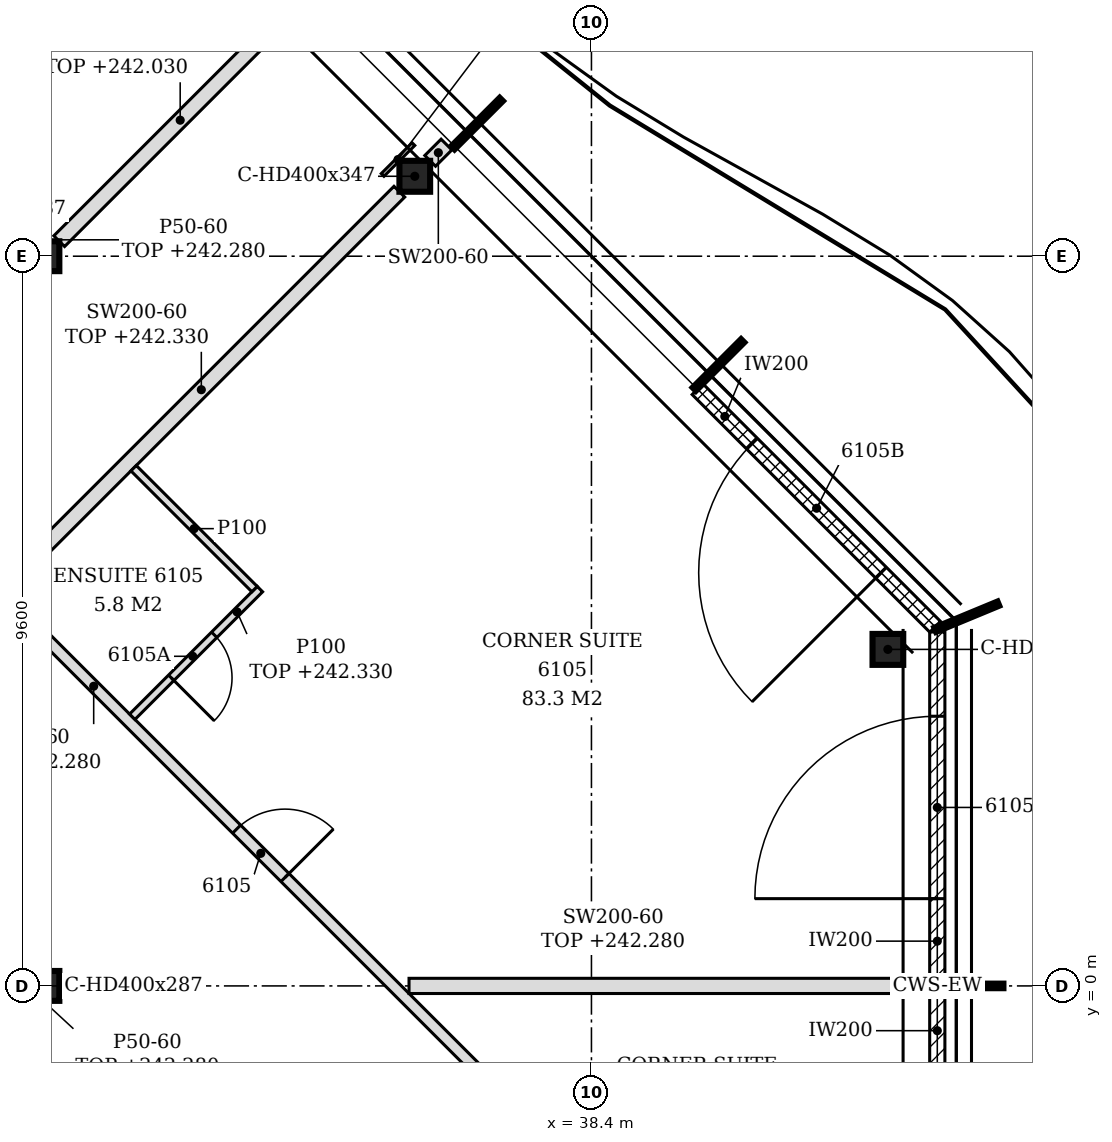
"""IFC4 building model, lengths in metres.
Left out: names, types, materials, properties, quantities, classifications, styles, units other than length and angle.
Written with IfcOpenShell. Run it as: python <this file> out.ifc"""

import sys

from ifc_helpers import new_model, si_unit, direction, frame, frame_2d, origin, origin_2d, place, context, subcontext, project, spatial, rectangle, i_section, extrude, element, fill, save


model = new_model("IFC4")
c1 = context("Model", 3, precision=1e-05, world=origin(), true_north=direction((0.0, 1.0)))
c2 = subcontext(c1, "Body", "Model", "MODEL_VIEW")
j1 = project(units=[si_unit("LENGTHUNIT", "METRE"), si_unit("PLANEANGLEUNIT", "RADIAN")], contexts=[c1])
p1 = place(None, origin())
s1 = spatial("IfcSite", under=j1, at=p1, CompositionType="ELEMENT")
p2 = place(p1, origin())
s2 = spatial("IfcBuilding", under=s1, at=p2, CompositionType="ELEMENT")
p3 = place(p2, frame((0.0, 0.0, 239.4)))
s3 = spatial("IfcBuildingStorey", under=s2, at=p3, CompositionType="ELEMENT", Elevation=239.4)
for number, where, z_axis, x_axis in (
    (1, (42.3, 4.427, -0.15), (0.0, 0.0, 1.0), (1.0, 0.0, 0.0)),
    (2, (36.076, 10.652, -0.15), (0.0, 0.0, 1.0), (1.0, 0.0, 0.0)),
):
    element("IfcColumn", number, at=place(p3, frame(where, z_axis=z_axis, x_axis=x_axis)), inside=s3, PredefinedType="COLUMN", context=c2, shape_type="SweptSolid", body=[
        extrude(i_section(OverallWidth=0.404, OverallDepth=0.407, WebThickness=0.027, FlangeThickness=0.044, FilletRadius=0.015, at=origin_2d()), origin(), (0.0, 0.0, 1.0), 3.6),
    ])
for number, where, z_axis, x_axis in (
    (3, (31.2, 0.0, -0.15), (0.0, 0.0, 1.0), (1.0, 0.0, 0.0)),
    (4, (31.2, 9.6, -0.15), (0.0, 0.0, 1.0), (1.0, 0.0, 0.0)),
):
    element("IfcColumn", number, at=place(p3, frame(where, z_axis=z_axis, x_axis=x_axis)), inside=s3, PredefinedType="COLUMN", context=c2, shape_type="SweptSolid", body=[
        extrude(i_section(OverallWidth=0.399, OverallDepth=0.393, WebThickness=0.023, FlangeThickness=0.037, FilletRadius=0.015, at=origin_2d()), origin(), (0.0, 0.0, 1.0), 3.6),
    ])
p4 = place(p3, frame((42.95, -4.656, 0.0), z_axis=(0.0, 0.0, 1.0), x_axis=(0.0, 1.0, 0.0)))
e5 = element("IfcWall", 5, at=p4, inside=s3, PredefinedType="NOTDEFINED", context=c2, shape_type="SweptSolid", body=[
    extrude(rectangle(XDim=4.626, YDim=0.2, at=frame_2d((2.313, 0.0))), origin(), (0.0, 0.0, 1.0), 3.45),
])
p5 = place(p4, frame((1.108, 0.0, 0.0)))
e6 = element("IfcOpeningElement", 6, at=p5, cuts=e5, PredefinedType="OPENING", context=c2, shape_type="SweptSolid", body=[
    extrude(rectangle(XDim=2.4, YDim=2.4, at=frame_2d((1.2, 1.2))), frame((0.0, 0.11, 0.0), z_axis=(0.0, -1.0, 0.0), x_axis=(1.0, 0.0, 0.0)), (0.0, 0.0, 1.0), 0.22),
])
p6 = place(p3, frame((42.95, 0.03, 0.0), z_axis=(0.0, 0.0, 1.0), x_axis=(0.0, 1.0, 0.0)))
e7 = element("IfcWall", 7, at=p6, inside=s3, PredefinedType="NOTDEFINED", context=c2, shape_type="SweptSolid", body=[
    extrude(rectangle(XDim=4.626, YDim=0.2, at=frame_2d((2.313, 0.0))), origin(), (0.0, 0.0, 1.0), 3.45),
])
p7 = place(p6, frame((1.118, 0.0, 0.0)))
e8 = element("IfcOpeningElement", 8, at=p7, cuts=e7, PredefinedType="OPENING", context=c2, shape_type="SweptSolid", body=[
    extrude(rectangle(XDim=2.4, YDim=2.4, at=frame_2d((1.2, 1.2))), frame((0.0, 0.11, 0.0), z_axis=(0.0, -1.0, 0.0), x_axis=(1.0, 0.0, 0.0)), (0.0, 0.0, 1.0), 0.22),
])
p8 = place(p3, frame((42.922, 4.725, 0.0), z_axis=(0.0, 0.0, 1.0), x_axis=(-0.707079168996, 0.707134392299, 0.0)))
e9 = element("IfcWall", 9, at=p8, inside=s3, PredefinedType="NOTDEFINED", context=c2, shape_type="SweptSolid", body=[
    extrude(rectangle(XDim=4.421, YDim=0.2, at=frame_2d((2.21, 0.0))), origin(), (0.0, 0.0, 1.0), 3.45),
])
p9 = place(p8, frame((1.005, 0.0, 0.0)))
e10 = element("IfcOpeningElement", 10, at=p9, cuts=e9, PredefinedType="OPENING", context=c2, shape_type="SweptSolid", body=[
    extrude(rectangle(XDim=2.4, YDim=2.4, at=frame_2d((1.2, 1.2))), frame((0.0, 0.11, 0.0), z_axis=(0.0, -1.0, 0.0), x_axis=(1.0, 0.0, 0.0)), (0.0, 0.0, 1.0), 0.22),
])
p10 = place(p3, frame((37.072, -1.278, 0.0), z_axis=(0.0, 0.0, 1.0), x_axis=(-0.707106781187, 0.707106781187, 0.0)))
e11 = element("IfcWall", 11, at=p10, inside=s3, PredefinedType="PARTITIONING", context=c2, shape_type="SweptSolid", body=[
    extrude(rectangle(XDim=20.294, YDim=0.15, at=frame_2d((10.147, 0.0))), origin(), (0.0, 0.0, 1.0), 2.88),
])
p11 = place(p10, frame((3.824, 0.0, 0.0)))
e12 = element("IfcOpeningElement", 12, at=p11, cuts=e11, PredefinedType="OPENING", context=c2, shape_type="SweptSolid", body=[
    extrude(rectangle(XDim=0.9, YDim=2.1, at=frame_2d((0.45, 1.05))), frame((0.0, 0.085, 0.0), z_axis=(0.0, -1.0, 0.0), x_axis=(1.0, 0.0, 0.0)), (0.0, 0.0, 1.0), 0.17),
])
p12 = place(p10, frame((10.042, 0.0, 0.0)))
e13 = element("IfcOpeningElement", 13, at=p12, cuts=e11, PredefinedType="OPENING", context=c2, shape_type="SweptSolid", body=[
    extrude(rectangle(XDim=0.9, YDim=2.1, at=frame_2d((0.45, 1.05))), frame((0.0, 0.085, 0.0), z_axis=(0.0, -1.0, 0.0), x_axis=(1.0, 0.0, 0.0)), (0.0, 0.0, 1.0), 0.17),
])
p13 = place(p10, frame((14.443, 0.0, 0.0)))
e14 = element("IfcOpeningElement", 14, at=p13, cuts=e11, PredefinedType="OPENING", context=c2, shape_type="SweptSolid", body=[
    extrude(rectangle(XDim=0.9, YDim=2.1, at=frame_2d((0.45, 1.05))), frame((0.0, 0.085, 0.0), z_axis=(0.0, -1.0, 0.0), x_axis=(1.0, 0.0, 0.0)), (0.0, 0.0, 1.0), 0.17),
])
p14 = place(p3, frame((36.0, 0.0, 0.0), z_axis=(0.0, 0.0, 1.0), x_axis=(1.0, 0.0, 0.0)))
e15 = element("IfcWall", 15, at=p14, inside=s3, PredefinedType="PARTITIONING", context=c2, shape_type="SweptSolid", body=[
    extrude(rectangle(XDim=6.85, YDim=0.2, at=frame_2d((3.425, 0.0))), origin(), (0.0, 0.0, 1.0), 2.88),
])
p15 = place(p3, frame((32.359, 3.541, 0.0), z_axis=(0.0, 0.0, 1.0), x_axis=(0.707158179099, 0.707055379538, 0.0)))
e16 = element("IfcWall", 16, at=p15, inside=s3, PredefinedType="PARTITIONING", context=c2, shape_type="SweptSolid", body=[
    extrude(rectangle(XDim=2.375, YDim=0.1, at=frame_2d((1.188, 0.0))), origin(), (0.0, 0.0, 1.0), 2.93),
])
p16 = place(p15, frame((0.725, 0.0, 0.0)))
e17 = element("IfcOpeningElement", 17, at=p16, cuts=e16, PredefinedType="OPENING", context=c2, shape_type="SweptSolid", body=[
    extrude(rectangle(XDim=0.8, YDim=2.1, at=frame_2d((0.4, 1.05))), frame((0.0, 0.06, 0.0), z_axis=(0.0, -1.0, 0.0), x_axis=(1.0, 0.0, 0.0)), (0.0, 0.0, 1.0), 0.12),
])
p17 = place(p3, frame((30.662, 5.238, 0.0), z_axis=(0.0, 0.0, 1.0), x_axis=(0.707106781187, 0.707106781187, 0.0)))
e18 = element("IfcWall", 18, at=p17, inside=s3, PredefinedType="PARTITIONING", context=c2, shape_type="SweptSolid", body=[
    extrude(rectangle(XDim=7.369, YDim=0.2, at=frame_2d((3.685, 0.0))), origin(), (0.0, 0.0, 1.0), 2.93),
])
p18 = place(p3, frame((33.968, 5.22, 0.0), z_axis=(0.0, 0.0, 1.0), x_axis=(-0.707106781187, 0.707106781187, 0.0)))
e19 = element("IfcWall", 19, at=p18, inside=s3, PredefinedType="PARTITIONING", context=c2, shape_type="SweptSolid", body=[
    extrude(rectangle(XDim=2.25, YDim=0.1, at=frame_2d((1.125, 0.0))), origin(), (0.0, 0.0, 1.0), 3.45),
])
p19 = place(p3, frame((31.398, 9.798, 0.0), z_axis=(0.0, 0.0, 1.0), x_axis=(0.707133900936, 0.707079660397, 0.0)))
e20 = element("IfcWall", 20, at=p19, inside=s3, PredefinedType="PARTITIONING", context=c2, shape_type="SweptSolid", body=[
    extrude(rectangle(XDim=4.501, YDim=0.2, at=frame_2d((2.25, 0.0))), origin(), (0.0, 0.0, 1.0), 2.63),
])
p20 = place(p3, frame((36.278, 10.854, 0.0), z_axis=(0.0, 0.0, 1.0), x_axis=(0.707509117806, 0.706704215511, 0.0)))
e21 = element("IfcWall", 21, at=p20, inside=s3, PredefinedType="PARTITIONING", context=c2, shape_type="SweptSolid", body=[
    extrude(rectangle(XDim=0.303, YDim=0.2, at=frame_2d((0.152, 0.0))), origin(), (0.0, 0.0, 1.0), 3.45),
])
p21 = place(p3, frame((35.653, 10.669, 0.0), z_axis=(0.0, 0.0, 1.0), x_axis=(0.707106781187, 0.707106781187, 0.0)))
e22 = element("IfcWall", 22, at=p21, inside=s3, PredefinedType="PARTITIONING", context=c2, shape_type="SweptSolid", body=[
    extrude(rectangle(XDim=0.573, YDim=0.05, at=frame_2d((0.287, 0.0))), origin(), (0.0, 0.0, 1.0), 2.63),
])
p22 = place(p7, origin())
e23 = element("IfcDoor", 23, at=p22, inside=s3, OperationType="SINGLE_SWING_LEFT", PredefinedType="DOOR", context=c2, shape_type="SweptSolid", body=[
    extrude(rectangle(XDim=2.4, YDim=2.4, at=frame_2d((1.2, 1.2))), frame((0.0, 0.025, 0.0), z_axis=(0.0, -1.0, 0.0), x_axis=(1.0, 0.0, 0.0)), (0.0, 0.0, 1.0), 0.05),
])
fill(e8, e23)
p23 = place(p9, origin())
e24 = element("IfcDoor", 24, at=p23, inside=s3, OperationType="SINGLE_SWING_LEFT", PredefinedType="DOOR", context=c2, shape_type="SweptSolid", body=[
    extrude(rectangle(XDim=2.4, YDim=2.4, at=frame_2d((1.2, 1.2))), frame((0.0, 0.025, 0.0), z_axis=(0.0, -1.0, 0.0), x_axis=(1.0, 0.0, 0.0)), (0.0, 0.0, 1.0), 0.05),
])
fill(e10, e24)
p24 = place(p11, frame((0.9, 0.0, 0.0), z_axis=(0.0, 0.0, 1.0), x_axis=(-1.0, 0.0, 0.0)))
e25 = element("IfcDoor", 25, at=p24, inside=s3, OperationType="SINGLE_SWING_RIGHT", PredefinedType="DOOR", context=c2, shape_type="SweptSolid", body=[
    extrude(rectangle(XDim=0.9, YDim=2.1, at=frame_2d((0.45, 1.05))), frame((0.0, 0.025, 0.0), z_axis=(0.0, -1.0, 0.0), x_axis=(1.0, 0.0, 0.0)), (0.0, 0.0, 1.0), 0.05),
])
fill(e12, e25)
p25 = place(p16, frame((0.8, 0.0, 0.0), z_axis=(0.0, 0.0, 1.0), x_axis=(-1.0, 0.0, 0.0)))
e26 = element("IfcDoor", 26, at=p25, inside=s3, OperationType="SINGLE_SWING_RIGHT", PredefinedType="DOOR", context=c2, shape_type="SweptSolid", body=[
    extrude(rectangle(XDim=0.8, YDim=2.1, at=frame_2d((0.4, 1.05))), frame((0.0, 0.025, 0.0), z_axis=(0.0, -1.0, 0.0), x_axis=(1.0, 0.0, 0.0)), (0.0, 0.0, 1.0), 0.05),
])
fill(e17, e26)
save(model, sys.argv[1])
